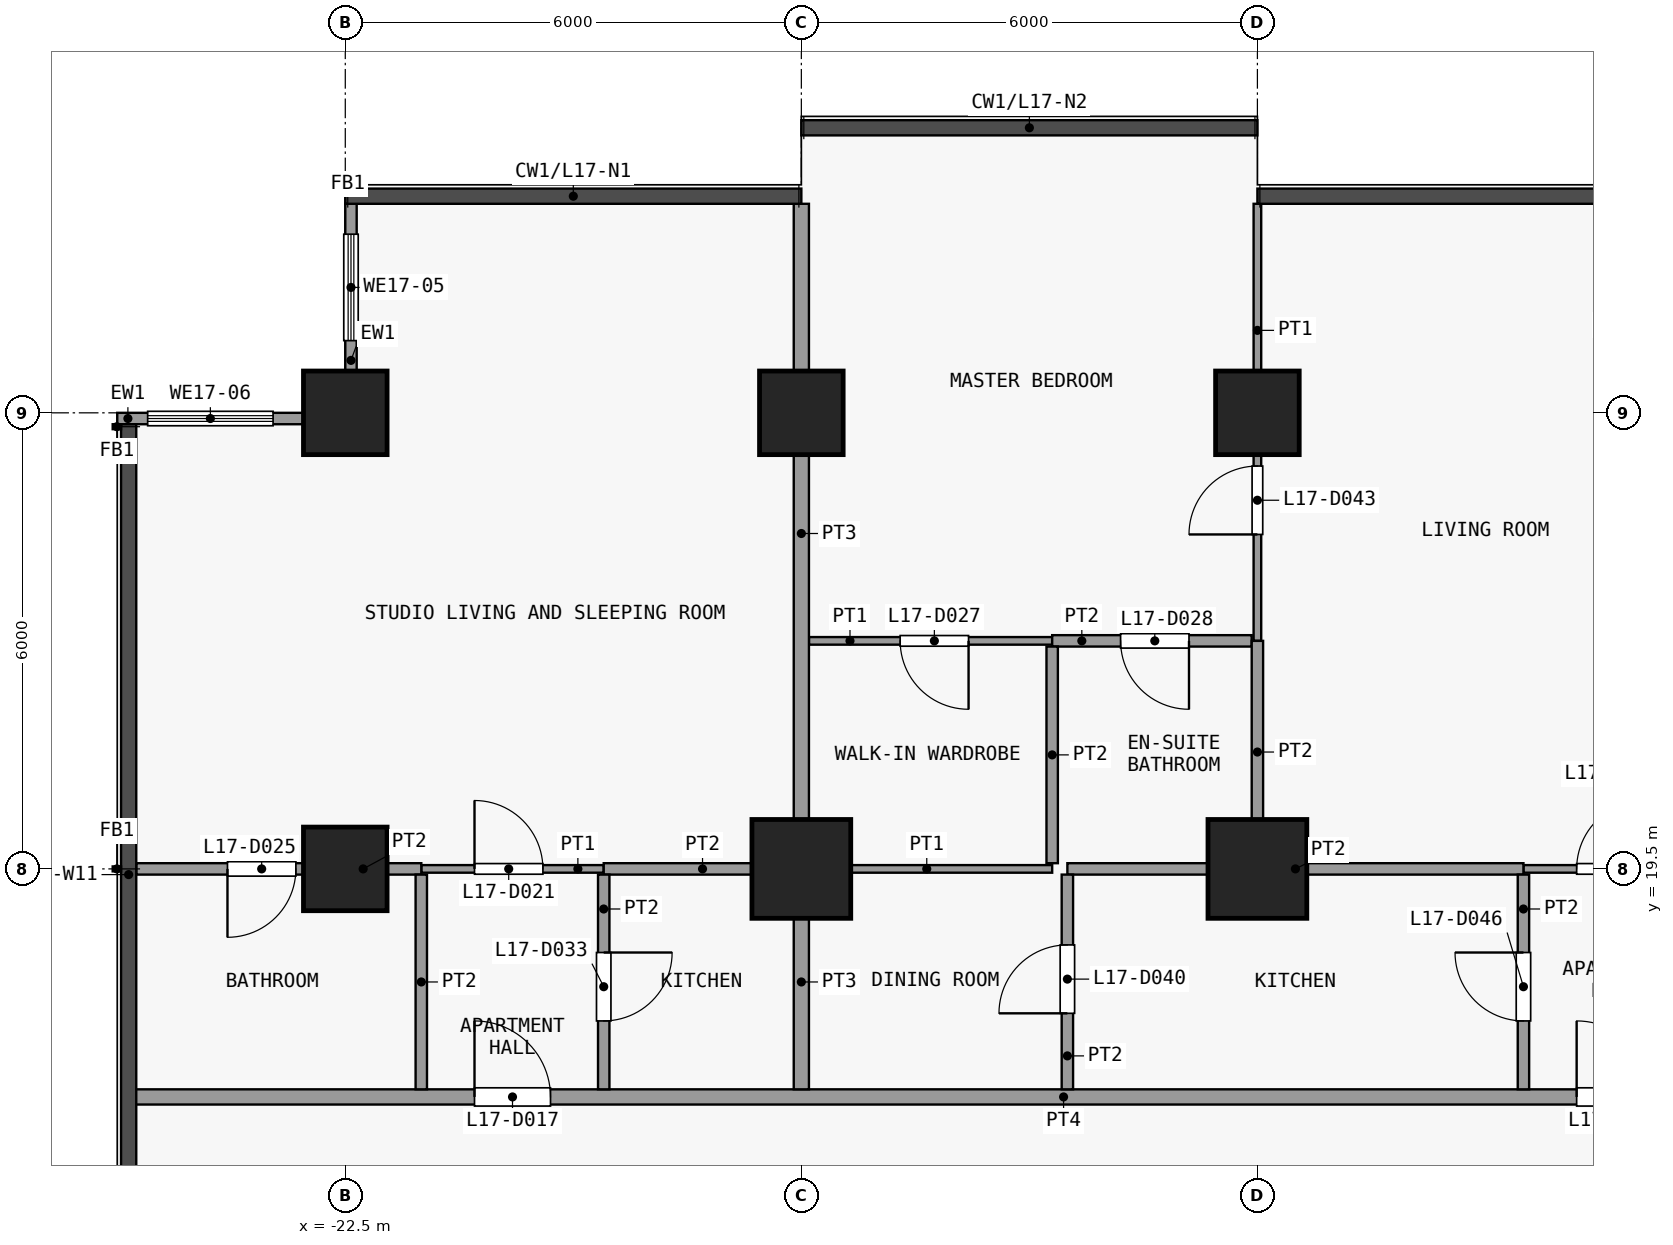
"""IFC4 building model, lengths in metres.
Left out: names, types, materials, properties, quantities, classifications, styles, units other than length and angle.
Written with IfcOpenShell. Run it as: python <this file> out.ifc"""

import sys

from ifc_helpers import new_model, si_unit, direction, frame, frame_2d, origin, origin_2d, place, context, subcontext, project, spatial, rectangle, extrude, element, fill, save


model = new_model("IFC4")
c1 = context("Model", 3, precision=1e-05, world=origin(), true_north=direction((0.0, 1.0)))
c2 = subcontext(c1, "Body", "Model", "MODEL_VIEW")
j1 = project(units=[si_unit("LENGTHUNIT", "METRE"), si_unit("PLANEANGLEUNIT", "RADIAN")], contexts=[c1])
p1 = place(None, origin())
s1 = spatial("IfcSite", under=j1, at=p1, CompositionType="ELEMENT")
p2 = place(p1, origin())
s2 = spatial("IfcBuilding", under=s1, at=p2, CompositionType="ELEMENT")
p3 = place(p2, frame((0.0, 0.0, 72.1)))
s3 = spatial("IfcBuildingStorey", under=s2, at=p3, CompositionType="ELEMENT", Elevation=72.1)
for number, where, z_axis, x_axis in (
    (1, (-22.5, 19.5, 0.0), (0.0, 0.0, 1.0), (1.0, 0.0, 0.0)),
    (2, (-22.5, 25.5, 0.0), (0.0, 0.0, 1.0), (1.0, 0.0, 0.0)),
):
    element("IfcColumn", number, at=place(p3, frame(where, z_axis=z_axis, x_axis=x_axis)), inside=s3, PredefinedType="COLUMN", context=c2, shape_type="SweptSolid", body=[
        extrude(rectangle(XDim=1.1, YDim=1.1, at=origin_2d()), origin(), (0.0, 0.0, 1.0), 3.6),
    ])
p4 = place(p3, frame((-16.5, 19.5, 0.0), z_axis=(0.0, 0.0, 1.0), x_axis=(1.0, 0.0, 0.0)))
e3 = element("IfcColumn", 3, at=p4, inside=s3, PredefinedType="COLUMN", context=c2, shape_type="SweptSolid", body=[
    extrude(rectangle(XDim=1.3, YDim=1.3, at=origin_2d()), origin(), (0.0, 0.0, 1.0), 3.6),
])
p5 = place(p3, frame((-16.5, 25.5, 0.0), z_axis=(0.0, 0.0, 1.0), x_axis=(1.0, 0.0, 0.0)))
e4 = element("IfcColumn", 4, at=p5, inside=s3, PredefinedType="COLUMN", context=c2, shape_type="SweptSolid", body=[
    extrude(rectangle(XDim=1.1, YDim=1.1, at=origin_2d()), origin(), (0.0, 0.0, 1.0), 3.6),
])
p6 = place(p3, frame((-10.5, 19.5, 0.0), z_axis=(0.0, 0.0, 1.0), x_axis=(1.0, 0.0, 0.0)))
e5 = element("IfcColumn", 5, at=p6, inside=s3, PredefinedType="COLUMN", context=c2, shape_type="SweptSolid", body=[
    extrude(rectangle(XDim=1.3, YDim=1.3, at=origin_2d()), origin(), (0.0, 0.0, 1.0), 3.6),
])
p7 = place(p3, frame((-10.5, 25.5, 0.0), z_axis=(0.0, 0.0, 1.0), x_axis=(1.0, 0.0, 0.0)))
e6 = element("IfcColumn", 6, at=p7, inside=s3, PredefinedType="COLUMN", context=c2, shape_type="SweptSolid", body=[
    extrude(rectangle(XDim=1.1, YDim=1.1, at=origin_2d()), origin(), (0.0, 0.0, 1.0), 3.6),
])
p8 = place(p3, frame((-22.425, 26.05, 0.0), z_axis=(0.0, 0.0, 1.0), x_axis=(0.0, 1.0, 0.0)))
e7 = element("IfcWall", 7, at=p8, inside=s3, PredefinedType="SOLIDWALL", context=c2, shape_type="SweptSolid", body=[
    extrude(rectangle(XDim=2.2, YDim=0.15, at=frame_2d((1.1, 0.0))), origin(), (0.0, 0.0, 1.0), 3.15),
])
p9 = place(p8, frame((0.4, 0.0, 0.9)))
e8 = element("IfcOpeningElement", 8, at=p9, cuts=e7, PredefinedType="OPENING", context=c2, shape_type="SweptSolid", body=[
    extrude(rectangle(XDim=1.4, YDim=2.4, at=frame_2d((0.7, 1.2))), frame((0.0, 0.085, 0.0), z_axis=(0.0, -1.0, 0.0), x_axis=(1.0, 0.0, 0.0)), (0.0, 0.0, 1.0), 0.17),
])
p10 = place(p3, frame((-25.5, 25.425, 0.0), z_axis=(0.0, 0.0, 1.0), x_axis=(1.0, 0.0, 0.0)))
e9 = element("IfcWall", 9, at=p10, inside=s3, PredefinedType="SOLIDWALL", context=c2, shape_type="SweptSolid", body=[
    extrude(rectangle(XDim=2.45, YDim=0.15, at=frame_2d((1.225, 0.0))), origin(), (0.0, 0.0, 1.0), 3.15),
])
p11 = place(p10, frame((0.4, 0.0, 0.9)))
e10 = element("IfcOpeningElement", 10, at=p11, cuts=e9, PredefinedType="OPENING", context=c2, shape_type="SweptSolid", body=[
    extrude(rectangle(XDim=1.65, YDim=2.4, at=frame_2d((0.825, 1.2))), frame((0.0, 0.085, 0.0), z_axis=(0.0, -1.0, 0.0), x_axis=(1.0, 0.0, 0.0)), (0.0, 0.0, 1.0), 0.17),
])
p12 = place(p3, frame((-25.35, 16.5, 0.0), z_axis=(0.0, 0.0, 1.0), x_axis=(1.0, 0.0, 0.0)))
e11 = element("IfcWall", 11, at=p12, inside=s3, PredefinedType="PARTITIONING", context=c2, shape_type="SweptSolid", body=[
    extrude(rectangle(XDim=50.7, YDim=0.2, at=frame_2d((25.35, 0.0))), origin(), (0.0, 0.0, 1.0), 3.15),
])
p13 = place(p12, frame((4.55, 0.0, 0.0)))
e12 = element("IfcOpeningElement", 12, at=p13, cuts=e11, PredefinedType="OPENING", context=c2, shape_type="SweptSolid", body=[
    extrude(rectangle(XDim=1.0, YDim=2.1, at=frame_2d((0.5, 1.05))), frame((0.0, 0.11, 0.0), z_axis=(0.0, -1.0, 0.0), x_axis=(1.0, 0.0, 0.0)), (0.0, 0.0, 1.0), 0.22),
])
p14 = place(p12, frame((19.05, 0.0, 0.0)))
e13 = element("IfcOpeningElement", 13, at=p14, cuts=e11, PredefinedType="OPENING", context=c2, shape_type="SweptSolid", body=[
    extrude(rectangle(XDim=1.0, YDim=2.1, at=frame_2d((0.5, 1.05))), frame((0.0, 0.11, 0.0), z_axis=(0.0, -1.0, 0.0), x_axis=(1.0, 0.0, 0.0)), (0.0, 0.0, 1.0), 0.22),
])
p15 = place(p12, frame((33.05, 0.0, 0.0)))
e14 = element("IfcOpeningElement", 14, at=p15, cuts=e11, PredefinedType="OPENING", context=c2, shape_type="SweptSolid", body=[
    extrude(rectangle(XDim=1.0, YDim=2.1, at=frame_2d((0.5, 1.05))), frame((0.0, 0.11, 0.0), z_axis=(0.0, -1.0, 0.0), x_axis=(1.0, 0.0, 0.0)), (0.0, 0.0, 1.0), 0.22),
])
p16 = place(p12, frame((45.05, 0.0, 0.0)))
e15 = element("IfcOpeningElement", 15, at=p16, cuts=e11, PredefinedType="OPENING", context=c2, shape_type="SweptSolid", body=[
    extrude(rectangle(XDim=1.0, YDim=2.1, at=frame_2d((0.5, 1.05))), frame((0.0, 0.11, 0.0), z_axis=(0.0, -1.0, 0.0), x_axis=(1.0, 0.0, 0.0)), (0.0, 0.0, 1.0), 0.22),
])
p17 = place(p3, frame((-21.5, 19.5, 0.0), z_axis=(0.0, 0.0, 1.0), x_axis=(1.0, 0.0, 0.0)))
e16 = element("IfcWall", 16, at=p17, inside=s3, PredefinedType="PARTITIONING", context=c2, shape_type="SweptSolid", body=[
    extrude(rectangle(XDim=2.4, YDim=0.1, at=frame_2d((1.2, 0.0))), origin(), (0.0, 0.0, 1.0), 3.15),
])
p18 = place(p17, frame((0.7, 0.0, 0.0)))
e17 = element("IfcOpeningElement", 17, at=p18, cuts=e16, PredefinedType="OPENING", context=c2, shape_type="SweptSolid", body=[
    extrude(rectangle(XDim=0.9, YDim=2.1, at=frame_2d((0.45, 1.05))), frame((0.0, 0.06, 0.0), z_axis=(0.0, -1.0, 0.0), x_axis=(1.0, 0.0, 0.0)), (0.0, 0.0, 1.0), 0.12),
])
p19 = place(p3, frame((-16.5, 19.5, 0.0), z_axis=(0.0, 0.0, 1.0), x_axis=(1.0, 0.0, 0.0)))
e18 = element("IfcWall", 18, at=p19, inside=s3, PredefinedType="PARTITIONING", context=c2, shape_type="SweptSolid", body=[
    extrude(rectangle(XDim=3.3, YDim=0.1, at=frame_2d((1.65, 0.0))), origin(), (0.0, 0.0, 1.0), 3.15),
])
p20 = place(p3, frame((-7.0, 19.5, 0.0), z_axis=(0.0, 0.0, 1.0), x_axis=(1.0, 0.0, 0.0)))
e19 = element("IfcWall", 19, at=p20, inside=s3, PredefinedType="PARTITIONING", context=c2, shape_type="SweptSolid", body=[
    extrude(rectangle(XDim=2.4, YDim=0.1, at=frame_2d((1.2, 0.0))), origin(), (0.0, 0.0, 1.0), 3.15),
])
p21 = place(p20, frame((0.7, 0.0, 0.0)))
e20 = element("IfcOpeningElement", 20, at=p21, cuts=e19, PredefinedType="OPENING", context=c2, shape_type="SweptSolid", body=[
    extrude(rectangle(XDim=0.9, YDim=2.1, at=frame_2d((0.45, 1.05))), frame((0.0, 0.06, 0.0), z_axis=(0.0, -1.0, 0.0), x_axis=(1.0, 0.0, 0.0)), (0.0, 0.0, 1.0), 0.12),
])
p22 = place(p3, frame((-25.25, 19.5, 0.0), z_axis=(0.0, 0.0, 1.0), x_axis=(1.0, 0.0, 0.0)))
e21 = element("IfcWall", 21, at=p22, inside=s3, PredefinedType="PARTITIONING", context=c2, shape_type="SweptSolid", body=[
    extrude(rectangle(XDim=3.75, YDim=0.15, at=frame_2d((1.875, 0.0))), origin(), (0.0, 0.0, 1.0), 3.15),
])
p23 = place(p22, frame((1.2, 0.0, 0.0)))
e22 = element("IfcOpeningElement", 22, at=p23, cuts=e21, PredefinedType="OPENING", context=c2, shape_type="SweptSolid", body=[
    extrude(rectangle(XDim=0.9, YDim=2.1, at=frame_2d((0.45, 1.05))), frame((0.0, 0.085, 0.0), z_axis=(0.0, -1.0, 0.0), x_axis=(1.0, 0.0, 0.0)), (0.0, 0.0, 1.0), 0.17),
])
p24 = place(p3, frame((-19.1, 19.5, 0.0), z_axis=(0.0, 0.0, 1.0), x_axis=(1.0, 0.0, 0.0)))
e23 = element("IfcWall", 23, at=p24, inside=s3, PredefinedType="PARTITIONING", context=c2, shape_type="SweptSolid", body=[
    extrude(rectangle(XDim=2.6, YDim=0.15, at=frame_2d((1.3, 0.0))), origin(), (0.0, 0.0, 1.0), 3.15),
])
p25 = place(p3, frame((-13.0, 19.5, 0.0), z_axis=(0.0, 0.0, 1.0), x_axis=(1.0, 0.0, 0.0)))
e24 = element("IfcWall", 24, at=p25, inside=s3, PredefinedType="PARTITIONING", context=c2, shape_type="SweptSolid", body=[
    extrude(rectangle(XDim=6.0, YDim=0.15, at=frame_2d((3.0, 0.0))), origin(), (0.0, 0.0, 1.0), 3.15),
])
p26 = place(p3, frame((-16.4, 22.5, 0.0), z_axis=(0.0, 0.0, 1.0), x_axis=(1.0, 0.0, 0.0)))
e25 = element("IfcWall", 25, at=p26, inside=s3, PredefinedType="PARTITIONING", context=c2, shape_type="SweptSolid", body=[
    extrude(rectangle(XDim=3.2, YDim=0.1, at=frame_2d((1.6, 0.0))), origin(), (0.0, 0.0, 1.0), 3.15),
])
p27 = place(p26, frame((1.2, 0.0, 0.0)))
e26 = element("IfcOpeningElement", 26, at=p27, cuts=e25, PredefinedType="OPENING", context=c2, shape_type="SweptSolid", body=[
    extrude(rectangle(XDim=0.9, YDim=2.1, at=frame_2d((0.45, 1.05))), frame((0.0, 0.06, 0.0), z_axis=(0.0, -1.0, 0.0), x_axis=(1.0, 0.0, 0.0)), (0.0, 0.0, 1.0), 0.12),
])
p28 = place(p3, frame((-13.2, 22.5, 0.0), z_axis=(0.0, 0.0, 1.0), x_axis=(1.0, 0.0, 0.0)))
e27 = element("IfcWall", 27, at=p28, inside=s3, PredefinedType="PARTITIONING", context=c2, shape_type="SweptSolid", body=[
    extrude(rectangle(XDim=2.625, YDim=0.15, at=frame_2d((1.312, 0.0))), origin(), (0.0, 0.0, 1.0), 3.15),
])
p29 = place(p28, frame((0.9, 0.0, 0.0)))
e28 = element("IfcOpeningElement", 28, at=p29, cuts=e27, PredefinedType="OPENING", context=c2, shape_type="SweptSolid", body=[
    extrude(rectangle(XDim=0.9, YDim=2.1, at=frame_2d((0.45, 1.05))), frame((0.0, 0.085, 0.0), z_axis=(0.0, -1.0, 0.0), x_axis=(1.0, 0.0, 0.0)), (0.0, 0.0, 1.0), 0.17),
])
p30 = place(p3, frame((-21.5, 16.6, 0.0), z_axis=(0.0, 0.0, 1.0), x_axis=(0.0, 1.0, 0.0)))
e29 = element("IfcWall", 29, at=p30, inside=s3, PredefinedType="PARTITIONING", context=c2, shape_type="SweptSolid", body=[
    extrude(rectangle(XDim=2.825, YDim=0.15, at=frame_2d((1.413, 0.0))), origin(), (0.0, 0.0, 1.0), 3.15),
])
p31 = place(p3, frame((-19.1, 16.6, 0.0), z_axis=(0.0, 0.0, 1.0), x_axis=(0.0, 1.0, 0.0)))
e30 = element("IfcWall", 30, at=p31, inside=s3, PredefinedType="PARTITIONING", context=c2, shape_type="SweptSolid", body=[
    extrude(rectangle(XDim=2.825, YDim=0.15, at=frame_2d((1.413, 0.0))), origin(), (0.0, 0.0, 1.0), 3.15),
])
p32 = place(p31, frame((0.9, 0.0, 0.0)))
e31 = element("IfcOpeningElement", 31, at=p32, cuts=e30, PredefinedType="OPENING", context=c2, shape_type="SweptSolid", body=[
    extrude(rectangle(XDim=0.9, YDim=2.1, at=frame_2d((0.45, 1.05))), frame((0.0, 0.085, 0.0), z_axis=(0.0, -1.0, 0.0), x_axis=(1.0, 0.0, 0.0)), (0.0, 0.0, 1.0), 0.17),
])
p33 = place(p3, frame((-16.5, 16.6, 0.0), z_axis=(0.0, 0.0, 1.0), x_axis=(0.0, 1.0, 0.0)))
e32 = element("IfcWall", 32, at=p33, inside=s3, PredefinedType="PARTITIONING", context=c2, shape_type="SweptSolid", body=[
    extrude(rectangle(XDim=2.825, YDim=0.2, at=frame_2d((1.413, 0.0))), origin(), (0.0, 0.0, 1.0), 3.15),
])
p34 = place(p3, frame((-16.5, 19.575, 0.0), z_axis=(0.0, 0.0, 1.0), x_axis=(0.0, 1.0, 0.0)))
e33 = element("IfcWall", 33, at=p34, inside=s3, PredefinedType="PARTITIONING", context=c2, shape_type="SweptSolid", body=[
    extrude(rectangle(XDim=8.675, YDim=0.2, at=frame_2d((4.337, 0.0))), origin(), (0.0, 0.0, 1.0), 3.15),
])
p35 = place(p3, frame((-13.2, 19.575, 0.0), z_axis=(0.0, 0.0, 1.0), x_axis=(0.0, 1.0, 0.0)))
e34 = element("IfcWall", 34, at=p35, inside=s3, PredefinedType="PARTITIONING", context=c2, shape_type="SweptSolid", body=[
    extrude(rectangle(XDim=2.85, YDim=0.15, at=frame_2d((1.425, 0.0))), origin(), (0.0, 0.0, 1.0), 3.15),
])
p36 = place(p3, frame((-13.0, 16.6, 0.0), z_axis=(0.0, 0.0, 1.0), x_axis=(0.0, 1.0, 0.0)))
e35 = element("IfcWall", 35, at=p36, inside=s3, PredefinedType="PARTITIONING", context=c2, shape_type="SweptSolid", body=[
    extrude(rectangle(XDim=2.825, YDim=0.15, at=frame_2d((1.413, 0.0))), origin(), (0.0, 0.0, 1.0), 3.15),
])
p37 = place(p36, frame((1.0, 0.0, 0.0)))
e36 = element("IfcOpeningElement", 36, at=p37, cuts=e35, PredefinedType="OPENING", context=c2, shape_type="SweptSolid", body=[
    extrude(rectangle(XDim=0.9, YDim=2.1, at=frame_2d((0.45, 1.05))), frame((0.0, 0.085, 0.0), z_axis=(0.0, -1.0, 0.0), x_axis=(1.0, 0.0, 0.0)), (0.0, 0.0, 1.0), 0.17),
])
p38 = place(p3, frame((-10.5, 22.5, 0.0), z_axis=(0.0, 0.0, 1.0), x_axis=(0.0, 1.0, 0.0)))
e37 = element("IfcWall", 37, at=p38, inside=s3, PredefinedType="PARTITIONING", context=c2, shape_type="SweptSolid", body=[
    extrude(rectangle(XDim=5.75, YDim=0.1, at=frame_2d((2.875, 0.0))), origin(), (0.0, 0.0, 1.0), 3.15),
])
p39 = place(p38, frame((1.4, 0.0, 0.0)))
e38 = element("IfcOpeningElement", 38, at=p39, cuts=e37, PredefinedType="OPENING", context=c2, shape_type="SweptSolid", body=[
    extrude(rectangle(XDim=0.9, YDim=2.1, at=frame_2d((0.45, 1.05))), frame((0.0, 0.06, 0.0), z_axis=(0.0, -1.0, 0.0), x_axis=(1.0, 0.0, 0.0)), (0.0, 0.0, 1.0), 0.12),
])
p40 = place(p3, frame((-10.5, 19.575, 0.0), z_axis=(0.0, 0.0, 1.0), x_axis=(0.0, 1.0, 0.0)))
e39 = element("IfcWall", 39, at=p40, inside=s3, PredefinedType="PARTITIONING", context=c2, shape_type="SweptSolid", body=[
    extrude(rectangle(XDim=2.925, YDim=0.15, at=frame_2d((1.462, 0.0))), origin(), (0.0, 0.0, 1.0), 3.15),
])
p41 = place(p3, frame((-7.0, 16.6, 0.0), z_axis=(0.0, 0.0, 1.0), x_axis=(0.0, 1.0, 0.0)))
e40 = element("IfcWall", 40, at=p41, inside=s3, PredefinedType="PARTITIONING", context=c2, shape_type="SweptSolid", body=[
    extrude(rectangle(XDim=2.825, YDim=0.15, at=frame_2d((1.413, 0.0))), origin(), (0.0, 0.0, 1.0), 3.15),
])
p42 = place(p41, frame((0.9, 0.0, 0.0)))
e41 = element("IfcOpeningElement", 41, at=p42, cuts=e40, PredefinedType="OPENING", context=c2, shape_type="SweptSolid", body=[
    extrude(rectangle(XDim=0.9, YDim=2.1, at=frame_2d((0.45, 1.05))), frame((0.0, 0.085, 0.0), z_axis=(0.0, -1.0, 0.0), x_axis=(1.0, 0.0, 0.0)), (0.0, 0.0, 1.0), 0.17),
])
p43 = place(p9, origin())
e42 = element("IfcWindow", 42, at=p43, inside=s3, PartitioningType="SINGLE_PANEL", PredefinedType="WINDOW", context=c2, shape_type="SweptSolid", body=[
    extrude(rectangle(XDim=1.4, YDim=2.4, at=frame_2d((0.7, 1.2))), frame((0.0, 0.03, 0.0), z_axis=(0.0, -1.0, 0.0), x_axis=(1.0, 0.0, 0.0)), (0.0, 0.0, 1.0), 0.06),
])
fill(e8, e42)
p44 = place(p11, origin())
e43 = element("IfcWindow", 43, at=p44, inside=s3, PartitioningType="SINGLE_PANEL", PredefinedType="WINDOW", context=c2, shape_type="SweptSolid", body=[
    extrude(rectangle(XDim=1.65, YDim=2.4, at=frame_2d((0.825, 1.2))), frame((0.0, 0.03, 0.0), z_axis=(0.0, -1.0, 0.0), x_axis=(1.0, 0.0, 0.0)), (0.0, 0.0, 1.0), 0.06),
])
fill(e10, e43)
p45 = place(p13, origin())
e44 = element("IfcDoor", 44, at=p45, inside=s3, OperationType="SINGLE_SWING_RIGHT", PredefinedType="DOOR", context=c2, shape_type="SweptSolid", body=[
    extrude(rectangle(XDim=1.0, YDim=2.1, at=frame_2d((0.5, 1.05))), frame((0.0, 0.025, 0.0), z_axis=(0.0, -1.0, 0.0), x_axis=(1.0, 0.0, 0.0)), (0.0, 0.0, 1.0), 0.05),
])
fill(e12, e44)
p46 = place(p14, origin())
e45 = element("IfcDoor", 45, at=p46, inside=s3, OperationType="SINGLE_SWING_RIGHT", PredefinedType="DOOR", context=c2, shape_type="SweptSolid", body=[
    extrude(rectangle(XDim=1.0, YDim=2.1, at=frame_2d((0.5, 1.05))), frame((0.0, 0.025, 0.0), z_axis=(0.0, -1.0, 0.0), x_axis=(1.0, 0.0, 0.0)), (0.0, 0.0, 1.0), 0.05),
])
fill(e13, e45)
p47 = place(p18, origin())
e46 = element("IfcDoor", 46, at=p47, inside=s3, OperationType="SINGLE_SWING_RIGHT", PredefinedType="DOOR", context=c2, shape_type="SweptSolid", body=[
    extrude(rectangle(XDim=0.9, YDim=2.1, at=frame_2d((0.45, 1.05))), frame((0.0, 0.025, 0.0), z_axis=(0.0, -1.0, 0.0), x_axis=(1.0, 0.0, 0.0)), (0.0, 0.0, 1.0), 0.05),
])
fill(e17, e46)
p48 = place(p21, origin())
e47 = element("IfcDoor", 47, at=p48, inside=s3, OperationType="SINGLE_SWING_LEFT", PredefinedType="DOOR", context=c2, shape_type="SweptSolid", body=[
    extrude(rectangle(XDim=0.9, YDim=2.1, at=frame_2d((0.45, 1.05))), frame((0.0, 0.025, 0.0), z_axis=(0.0, -1.0, 0.0), x_axis=(1.0, 0.0, 0.0)), (0.0, 0.0, 1.0), 0.05),
])
fill(e20, e47)
p49 = place(p23, origin())
e48 = element("IfcDoor", 48, at=p49, inside=s3, OperationType="SINGLE_SWING_LEFT", PredefinedType="DOOR", context=c2, shape_type="SweptSolid", body=[
    extrude(rectangle(XDim=0.9, YDim=2.1, at=frame_2d((0.45, 1.05))), frame((0.0, 0.025, 0.0), z_axis=(0.0, -1.0, 0.0), x_axis=(1.0, 0.0, 0.0)), (0.0, 0.0, 1.0), 0.05),
])
fill(e22, e48)
p50 = place(p27, origin())
e49 = element("IfcDoor", 49, at=p50, inside=s3, OperationType="SINGLE_SWING_RIGHT", PredefinedType="DOOR", context=c2, shape_type="SweptSolid", body=[
    extrude(rectangle(XDim=0.9, YDim=2.1, at=frame_2d((0.45, 1.05))), frame((0.0, 0.025, 0.0), z_axis=(0.0, -1.0, 0.0), x_axis=(1.0, 0.0, 0.0)), (0.0, 0.0, 1.0), 0.05),
])
fill(e26, e49)
p51 = place(p29, origin())
e50 = element("IfcDoor", 50, at=p51, inside=s3, OperationType="SINGLE_SWING_RIGHT", PredefinedType="DOOR", context=c2, shape_type="SweptSolid", body=[
    extrude(rectangle(XDim=0.9, YDim=2.1, at=frame_2d((0.45, 1.05))), frame((0.0, 0.025, 0.0), z_axis=(0.0, -1.0, 0.0), x_axis=(1.0, 0.0, 0.0)), (0.0, 0.0, 1.0), 0.05),
])
fill(e28, e50)
p52 = place(p32, origin())
e51 = element("IfcDoor", 51, at=p52, inside=s3, OperationType="SINGLE_SWING_RIGHT", PredefinedType="DOOR", context=c2, shape_type="SweptSolid", body=[
    extrude(rectangle(XDim=0.9, YDim=2.1, at=frame_2d((0.45, 1.05))), frame((0.0, 0.025, 0.0), z_axis=(0.0, -1.0, 0.0), x_axis=(1.0, 0.0, 0.0)), (0.0, 0.0, 1.0), 0.05),
])
fill(e31, e51)
p53 = place(p37, origin())
e52 = element("IfcDoor", 52, at=p53, inside=s3, OperationType="SINGLE_SWING_RIGHT", PredefinedType="DOOR", context=c2, shape_type="SweptSolid", body=[
    extrude(rectangle(XDim=0.9, YDim=2.1, at=frame_2d((0.45, 1.05))), frame((0.0, 0.025, 0.0), z_axis=(0.0, -1.0, 0.0), x_axis=(1.0, 0.0, 0.0)), (0.0, 0.0, 1.0), 0.05),
])
fill(e36, e52)
p54 = place(p39, origin())
e53 = element("IfcDoor", 53, at=p54, inside=s3, OperationType="SINGLE_SWING_RIGHT", PredefinedType="DOOR", context=c2, shape_type="SweptSolid", body=[
    extrude(rectangle(XDim=0.9, YDim=2.1, at=frame_2d((0.45, 1.05))), frame((0.0, 0.025, 0.0), z_axis=(0.0, -1.0, 0.0), x_axis=(1.0, 0.0, 0.0)), (0.0, 0.0, 1.0), 0.05),
])
fill(e38, e53)
p55 = place(p42, origin())
e54 = element("IfcDoor", 54, at=p55, inside=s3, OperationType="SINGLE_SWING_LEFT", PredefinedType="DOOR", context=c2, shape_type="SweptSolid", body=[
    extrude(rectangle(XDim=0.9, YDim=2.1, at=frame_2d((0.45, 1.05))), frame((0.0, 0.025, 0.0), z_axis=(0.0, -1.0, 0.0), x_axis=(1.0, 0.0, 0.0)), (0.0, 0.0, 1.0), 0.05),
])
fill(e41, e54)
save(model, sys.argv[1])
